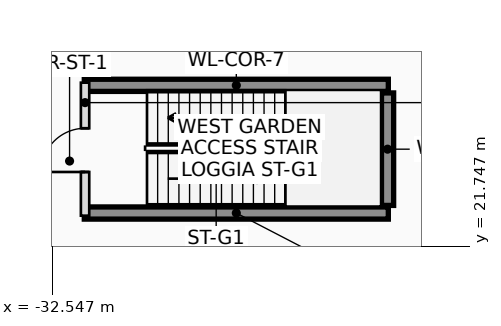
"""IFC4 building model, lengths in metres.
Left out: names, types, materials, properties, quantities, classifications, styles, units other than length and angle.
Written with IfcOpenShell. Run it as: python <this file> out.ifc"""

import sys

from ifc_helpers import new_model, si_unit, direction, frame, frame_2d, origin, place, context, subcontext, project, spatial, rectangle, extrude, element, fill, save


model = new_model("IFC4")
c1 = context("Model", 3, precision=1e-05, world=origin(), true_north=direction((0.0, 1.0)))
c2 = subcontext(c1, "Body", "Model", "MODEL_VIEW")
j1 = project(units=[si_unit("LENGTHUNIT", "METRE"), si_unit("PLANEANGLEUNIT", "RADIAN")], contexts=[c1])
p1 = place(None, origin())
s1 = spatial("IfcSite", under=j1, at=p1, CompositionType="ELEMENT")
p2 = place(p1, origin())
s2 = spatial("IfcBuilding", under=s1, at=p2, CompositionType="ELEMENT")
p3 = place(p2, origin())
s3 = spatial("IfcBuildingStorey", under=s2, at=p3, CompositionType="ELEMENT", Elevation=0.0)
for number, where, z_axis, x_axis in (
    (1, (-31.7, 25.98, 0.0), (0.0, 0.0, 1.0), (1.0, 0.0, 0.0)),
    (2, (-31.7, 22.62, 0.0), (0.0, 0.0, 1.0), (1.0, 0.0, 0.0)),
):
    element("IfcWall", number, at=place(p3, frame(where, z_axis=z_axis, x_axis=x_axis)), inside=s3, PredefinedType="SHEAR", context=c2, shape_type="SweptSolid", body=[
        extrude(rectangle(XDim=8.0, YDim=0.32, at=frame_2d((4.0, 0.0))), origin(), (0.0, 0.0, 1.0), 4.5),
    ])
p4 = place(p3, frame((-23.72, 22.82, 0.0), z_axis=(0.0, 0.0, 1.0), x_axis=(0.0, 1.0, 0.0)))
e3 = element("IfcWall", 3, at=p4, inside=s3, PredefinedType="SHEAR", context=c2, shape_type="SweptSolid", body=[
    extrude(rectangle(XDim=2.96, YDim=0.32, at=frame_2d((1.48, 0.0))), origin(), (0.0, 0.0, 1.0), 4.5),
])
p5 = place(p3, frame((-31.68, 22.55, 0.0), z_axis=(0.0, 0.0, 1.0), x_axis=(0.0, 1.0, 0.0)))
e4 = element("IfcWall", 4, at=p5, inside=s3, PredefinedType="PLUMBINGWALL", context=c2, shape_type="SweptSolid", body=[
    extrude(rectangle(XDim=3.5, YDim=0.22, at=frame_2d((1.75, 0.0))), origin(), (0.0, 0.0, 1.0), 4.17),
])
p6 = place(p5, frame((1.15, 0.0, 0.0)))
e5 = element("IfcOpeningElement", 5, at=p6, cuts=e4, PredefinedType="OPENING", context=c2, shape_type="SweptSolid", body=[
    extrude(rectangle(XDim=1.15, YDim=2.15, at=frame_2d((0.575, 1.075))), frame((0.0, 0.12, 0.0), z_axis=(0.0, -1.0, 0.0), x_axis=(1.0, 0.0, 0.0)), (0.0, 0.0, 1.0), 0.24),
])
p7 = place(p6, origin())
e6 = element("IfcDoor", 6, at=p7, inside=s3, OperationType="SINGLE_SWING_LEFT", PredefinedType="DOOR", context=c2, shape_type="SweptSolid", body=[
    extrude(rectangle(XDim=1.15, YDim=2.15, at=frame_2d((0.575, 1.075))), frame((0.0, 0.025, 0.0), z_axis=(0.0, -1.0, 0.0), x_axis=(1.0, 0.0, 0.0)), (0.0, 0.0, 1.0), 0.05),
])
fill(e5, e6)
save(model, sys.argv[1])
